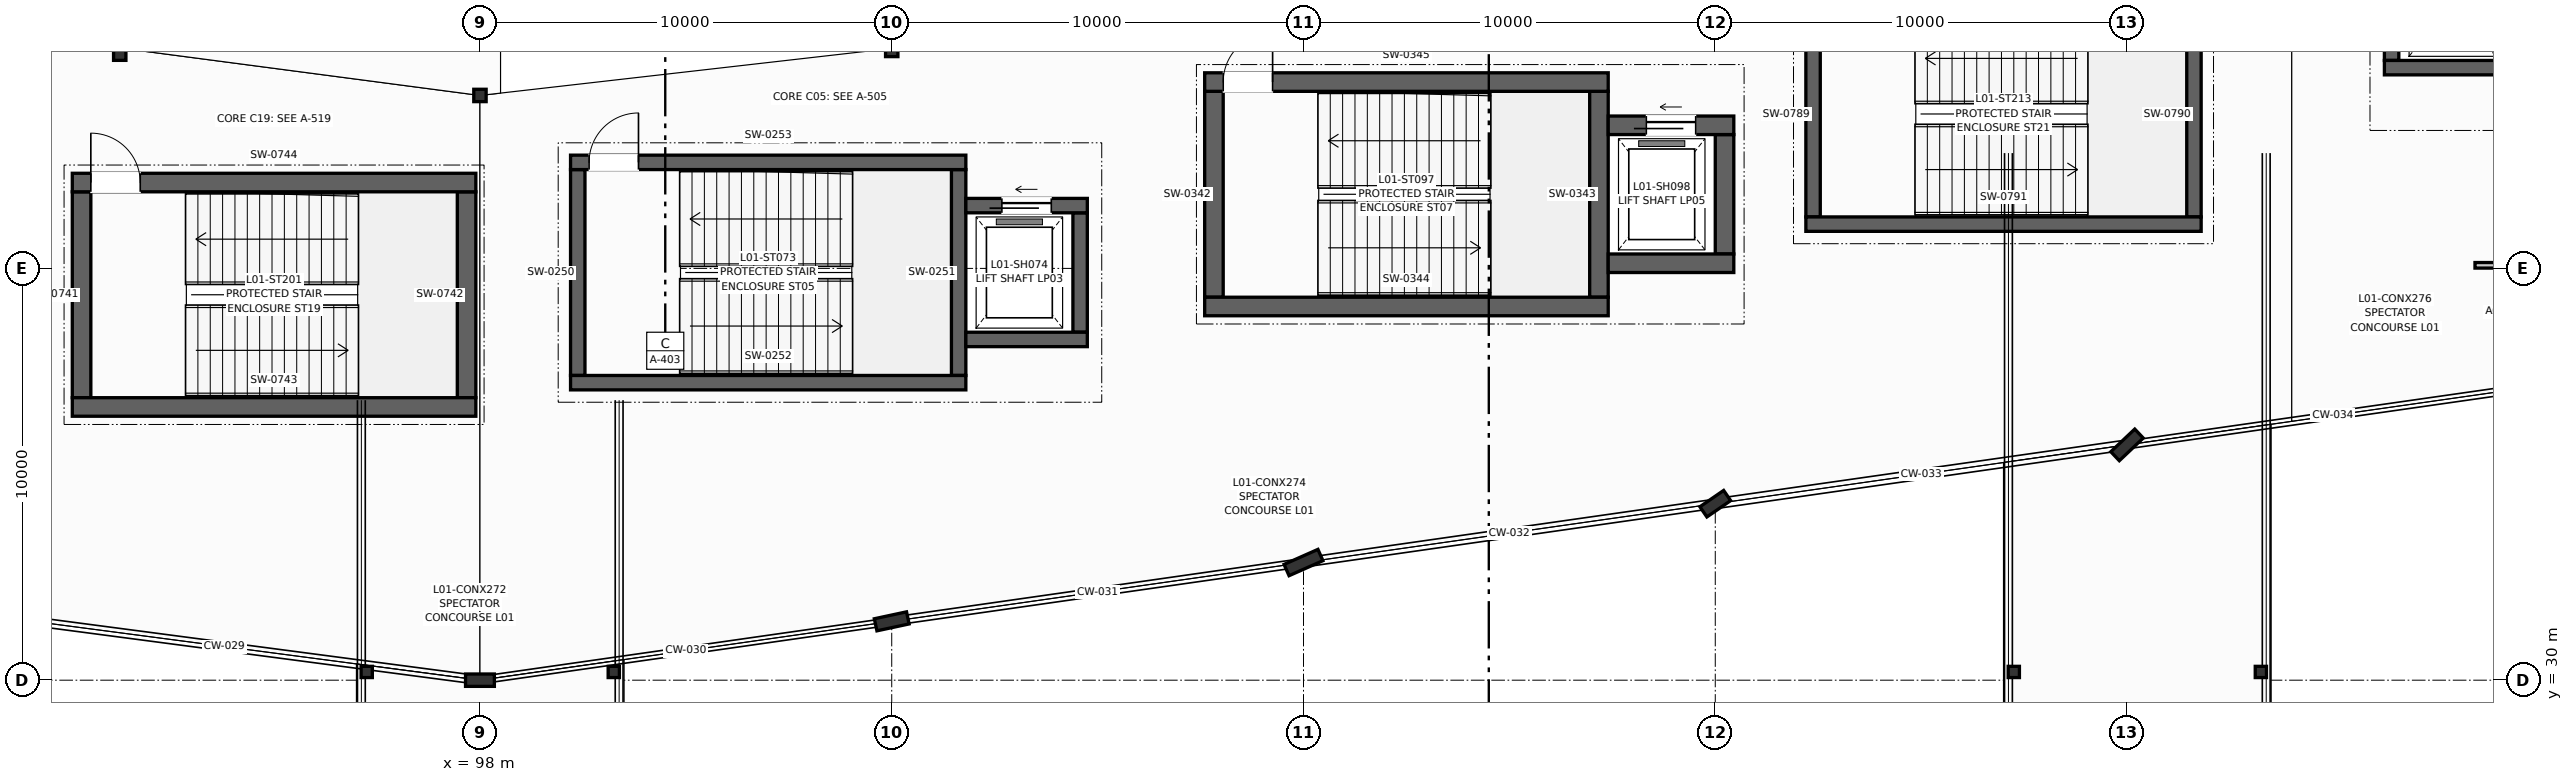
"""IFC4 building model, lengths in metres.
Left out: names, types, materials, properties, quantities, classifications, styles, units other than length and angle.
Written with IfcOpenShell. Run it as: python <this file> out.ifc"""

import sys

from ifc_helpers import new_model, si_unit, direction, frame, frame_2d, origin, origin_2d, place, context, subcontext, project, spatial, rectangle, hollow_circle, i_section, extrude, element, fill, save


model = new_model("IFC4")
c1 = context("Model", 3, precision=1e-05, world=origin(), true_north=direction((0.0, 1.0)))
c2 = subcontext(c1, "Body", "Model", "MODEL_VIEW")
j1 = project(units=[si_unit("LENGTHUNIT", "METRE"), si_unit("PLANEANGLEUNIT", "RADIAN")], contexts=[c1])
p1 = place(None, origin())
s1 = spatial("IfcSite", under=j1, at=p1, CompositionType="ELEMENT")
p2 = place(p1, origin())
s2 = spatial("IfcBuilding", under=s1, at=p2, CompositionType="ELEMENT")
p3 = place(p2, frame((0.0, 0.0, 4.5)))
s3 = spatial("IfcBuildingStorey", under=s2, at=p3, CompositionType="ELEMENT", Elevation=4.5)
p4 = place(p3, frame((89.252, 45.352, 0.0), z_axis=(0.0, 0.0, 1.0), x_axis=(1.0, 0.0, 0.0)))
e1 = element("IfcColumn", 1, at=p4, inside=s3, PredefinedType="COLUMN", context=c2, shape_type="SweptSolid", body=[
    extrude(i_section(OverallWidth=0.3, OverallDepth=0.6, WebThickness=0.015, FlangeThickness=0.03, at=origin_2d()), origin(), (0.0, 0.0, 1.0), 4.5),
])
p5 = place(p3, frame((98.0, 44.2, 0.0), z_axis=(0.0, 0.0, 1.0), x_axis=(1.0, 0.0, 0.0)))
e2 = element("IfcColumn", 2, at=p5, inside=s3, PredefinedType="COLUMN", context=c2, shape_type="SweptSolid", body=[
    extrude(i_section(OverallWidth=0.3, OverallDepth=0.3, WebThickness=0.011, FlangeThickness=0.019, at=origin_2d()), origin(), (0.0, 0.0, 1.0), 4.5),
])
p6 = place(p3, frame((108.0, 45.343, 0.0), z_axis=(0.0, 0.0, 1.0), x_axis=(1.0, 0.0, 0.0)))
e3 = element("IfcColumn", 3, at=p6, inside=s3, PredefinedType="COLUMN", context=c2, shape_type="SweptSolid", body=[
    extrude(i_section(OverallWidth=0.3, OverallDepth=0.4, WebThickness=0.013, FlangeThickness=0.024, at=origin_2d()), origin(), (0.0, 0.0, 1.0), 4.5),
])
p7 = place(p3, frame((98.0, 30.0, 0.0), z_axis=(0.0, 0.0, 1.0), x_axis=(0.0, 1.0, 0.0)))
e4 = element("IfcColumn", 4, at=p7, inside=s3, PredefinedType="COLUMN", context=c2, shape_type="SweptSolid", body=[
    extrude(i_section(OverallWidth=0.3, OverallDepth=0.7, WebThickness=0.017, FlangeThickness=0.032, at=origin_2d()), origin(), (0.0, 0.0, 1.0), 4.5),
])
p8 = place(p3, frame((108.0, 31.429, 0.0), z_axis=(0.0, 0.0, 1.0), x_axis=(-0.209618562904, 0.977783236759, 0.0)))
e5 = element("IfcColumn", 5, at=p8, inside=s3, PredefinedType="COLUMN", context=c2, shape_type="SweptSolid", body=[
    extrude(i_section(OverallWidth=0.3, OverallDepth=0.8, WebThickness=0.018, FlangeThickness=0.033, at=origin_2d()), origin(), (0.0, 0.0, 1.0), 4.5),
])
p9 = place(p3, frame((118.0, 32.857, 0.0), z_axis=(0.0, 0.0, 1.0), x_axis=(-0.40514158678, 0.914253955234, 0.0)))
e6 = element("IfcColumn", 6, at=p9, inside=s3, PredefinedType="COLUMN", context=c2, shape_type="SweptSolid", body=[
    extrude(i_section(OverallWidth=0.3, OverallDepth=0.9, WebThickness=0.019, FlangeThickness=0.035, at=origin_2d()), origin(), (0.0, 0.0, 1.0), 4.5),
])
p10 = place(p3, frame((128.0, 34.286, 0.0), z_axis=(0.0, 0.0, 1.0), x_axis=(-0.566406236925, 0.824126188622, 0.0)))
e7 = element("IfcColumn", 7, at=p10, inside=s3, PredefinedType="COLUMN", context=c2, shape_type="SweptSolid", body=[
    extrude(i_section(OverallWidth=0.3, OverallDepth=0.7, WebThickness=0.017, FlangeThickness=0.032, at=origin_2d()), origin(), (0.0, 0.0, 1.0), 4.5),
])
p11 = place(p3, frame((138.0, 35.714, 0.0), z_axis=(0.0, 0.0, 1.0), x_axis=(-0.687087510804, 0.726574670971, 0.0)))
e8 = element("IfcColumn", 8, at=p11, inside=s3, PredefinedType="COLUMN", context=c2, shape_type="SweptSolid", body=[
    extrude(i_section(OverallWidth=0.3, OverallDepth=0.8, WebThickness=0.018, FlangeThickness=0.033, at=origin_2d()), origin(), (0.0, 0.0, 1.0), 4.5),
])
for number, where, z_axis, x_axis in (
    (9, (95.25, 30.2, 0.0), (0.0, 0.0, 1.0), (1.0, 0.0, 0.0)),
    (10, (101.25, 30.2, 0.0), (0.0, 0.0, 1.0), (1.0, 0.0, 0.0)),
    (11, (135.25, 30.2, 0.0), (0.0, 0.0, 1.0), (1.0, 0.0, 0.0)),
    (12, (141.25, 30.2, 0.0), (0.0, 0.0, 1.0), (1.0, 0.0, 0.0)),
):
    element("IfcColumn", number, at=place(p3, frame(where, z_axis=z_axis, x_axis=x_axis)), inside=s3, PredefinedType="COLUMN", context=c2, shape_type="SweptSolid", body=[
        extrude(hollow_circle(Radius=0.136, WallThickness=0.012, at=origin_2d()), origin(), (0.0, 0.0, 1.0), 4.5),
    ])
for number, where, z_axis, x_axis in (
    (13, (100.375, 37.4, 0.0), (0.0, 0.0, 1.0), (0.0, 1.0, 0.0)),
    (14, (109.625, 37.4, 0.0), (0.0, 0.0, 1.0), (0.0, 1.0, 0.0)),
):
    element("IfcWall", number, at=place(p3, frame(where, z_axis=z_axis, x_axis=x_axis)), inside=s3, PredefinedType="SHEAR", context=c2, shape_type="SweptSolid", body=[
        extrude(rectangle(XDim=5.0, YDim=0.35, at=frame_2d((2.5, 0.0))), origin(), (0.0, 0.0, 1.0), 4.25),
    ])
p12 = place(p3, frame((100.2, 37.225, 0.0), z_axis=(0.0, 0.0, 1.0), x_axis=(1.0, 0.0, 0.0)))
e15 = element("IfcWall", 15, at=p12, inside=s3, PredefinedType="SHEAR", context=c2, shape_type="SweptSolid", body=[
    extrude(rectangle(XDim=9.6, YDim=0.35, at=frame_2d((4.8, 0.0))), origin(), (0.0, 0.0, 1.0), 4.25),
])
p13 = place(p3, frame((100.2, 42.575, 0.0), z_axis=(0.0, 0.0, 1.0), x_axis=(1.0, 0.0, 0.0)))
e16 = element("IfcWall", 16, at=p13, inside=s3, PredefinedType="SHEAR", context=c2, shape_type="SweptSolid", body=[
    extrude(rectangle(XDim=9.6, YDim=0.35, at=frame_2d((4.8, 0.0))), origin(), (0.0, 0.0, 1.0), 4.25),
])
p14 = place(p13, frame((0.45, 0.0, 0.0)))
e17 = element("IfcOpeningElement", 17, at=p14, cuts=e16, PredefinedType="OPENING", context=c2, shape_type="SweptSolid", body=[
    extrude(rectangle(XDim=1.2, YDim=2.2, at=frame_2d((0.6, 1.1))), frame((0.0, 0.185, 0.0), z_axis=(0.0, -1.0, 0.0), x_axis=(1.0, 0.0, 0.0)), (0.0, 0.0, 1.0), 0.37),
])
p15 = place(p3, frame((112.575, 38.45, 0.0), z_axis=(0.0, 0.0, 1.0), x_axis=(0.0, 1.0, 0.0)))
e18 = element("IfcWall", 18, at=p15, inside=s3, PredefinedType="SHEAR", context=c2, shape_type="SweptSolid", body=[
    extrude(rectangle(XDim=2.9, YDim=0.35, at=frame_2d((1.45, 0.0))), origin(), (0.0, 0.0, 1.0), 4.25),
])
p16 = place(p3, frame((109.8, 38.275, 0.0), z_axis=(0.0, 0.0, 1.0), x_axis=(1.0, 0.0, 0.0)))
e19 = element("IfcWall", 19, at=p16, inside=s3, PredefinedType="SHEAR", context=c2, shape_type="SweptSolid", body=[
    extrude(rectangle(XDim=2.95, YDim=0.35, at=frame_2d((1.475, 0.0))), origin(), (0.0, 0.0, 1.0), 4.25),
])
p17 = place(p3, frame((109.8, 41.525, 0.0), z_axis=(0.0, 0.0, 1.0), x_axis=(1.0, 0.0, 0.0)))
e20 = element("IfcWall", 20, at=p17, inside=s3, PredefinedType="SHEAR", context=c2, shape_type="SweptSolid", body=[
    extrude(rectangle(XDim=2.95, YDim=0.35, at=frame_2d((1.475, 0.0))), origin(), (0.0, 0.0, 1.0), 4.25),
])
p18 = place(p17, frame((0.875, 0.0, 0.0)))
e21 = element("IfcOpeningElement", 21, at=p18, cuts=e20, PredefinedType="OPENING", context=c2, shape_type="SweptSolid", body=[
    extrude(rectangle(XDim=1.2, YDim=2.2, at=frame_2d((0.6, 1.1))), frame((0.0, 0.185, 0.0), z_axis=(0.0, -1.0, 0.0), x_axis=(1.0, 0.0, 0.0)), (0.0, 0.0, 1.0), 0.37),
])
for number, where, z_axis, x_axis in (
    (22, (115.825, 39.3, 0.0), (0.0, 0.0, 1.0), (0.0, 1.0, 0.0)),
    (23, (125.175, 39.3, 0.0), (0.0, 0.0, 1.0), (0.0, 1.0, 0.0)),
):
    element("IfcWall", number, at=place(p3, frame(where, z_axis=z_axis, x_axis=x_axis)), inside=s3, PredefinedType="SHEAR", context=c2, shape_type="SweptSolid", body=[
        extrude(rectangle(XDim=5.0, YDim=0.45, at=frame_2d((2.5, 0.0))), origin(), (0.0, 0.0, 1.0), 4.25),
    ])
p19 = place(p3, frame((115.6, 39.075, 0.0), z_axis=(0.0, 0.0, 1.0), x_axis=(1.0, 0.0, 0.0)))
e24 = element("IfcWall", 24, at=p19, inside=s3, PredefinedType="SHEAR", context=c2, shape_type="SweptSolid", body=[
    extrude(rectangle(XDim=9.8, YDim=0.45, at=frame_2d((4.9, 0.0))), origin(), (0.0, 0.0, 1.0), 4.25),
])
p20 = place(p3, frame((115.6, 44.525, 0.0), z_axis=(0.0, 0.0, 1.0), x_axis=(1.0, 0.0, 0.0)))
e25 = element("IfcWall", 25, at=p20, inside=s3, PredefinedType="SHEAR", context=c2, shape_type="SweptSolid", body=[
    extrude(rectangle(XDim=9.8, YDim=0.45, at=frame_2d((4.9, 0.0))), origin(), (0.0, 0.0, 1.0), 4.25),
])
p21 = place(p20, frame((0.45, 0.0, 0.0)))
e26 = element("IfcOpeningElement", 26, at=p21, cuts=e25, PredefinedType="OPENING", context=c2, shape_type="SweptSolid", body=[
    extrude(rectangle(XDim=1.2, YDim=2.2, at=frame_2d((0.6, 1.1))), frame((0.0, 0.235, 0.0), z_axis=(0.0, -1.0, 0.0), x_axis=(1.0, 0.0, 0.0)), (0.0, 0.0, 1.0), 0.47),
])
p22 = place(p3, frame((128.225, 40.35, 0.0), z_axis=(0.0, 0.0, 1.0), x_axis=(0.0, 1.0, 0.0)))
e27 = element("IfcWall", 27, at=p22, inside=s3, PredefinedType="SHEAR", context=c2, shape_type="SweptSolid", body=[
    extrude(rectangle(XDim=2.9, YDim=0.45, at=frame_2d((1.45, 0.0))), origin(), (0.0, 0.0, 1.0), 4.25),
])
p23 = place(p3, frame((125.4, 40.125, 0.0), z_axis=(0.0, 0.0, 1.0), x_axis=(1.0, 0.0, 0.0)))
e28 = element("IfcWall", 28, at=p23, inside=s3, PredefinedType="SHEAR", context=c2, shape_type="SweptSolid", body=[
    extrude(rectangle(XDim=3.05, YDim=0.45, at=frame_2d((1.525, 0.0))), origin(), (0.0, 0.0, 1.0), 4.25),
])
p24 = place(p3, frame((125.4, 43.475, 0.0), z_axis=(0.0, 0.0, 1.0), x_axis=(1.0, 0.0, 0.0)))
e29 = element("IfcWall", 29, at=p24, inside=s3, PredefinedType="SHEAR", context=c2, shape_type="SweptSolid", body=[
    extrude(rectangle(XDim=3.05, YDim=0.45, at=frame_2d((1.525, 0.0))), origin(), (0.0, 0.0, 1.0), 4.25),
])
p25 = place(p24, frame((0.925, 0.0, 0.0)))
e30 = element("IfcOpeningElement", 30, at=p25, cuts=e29, PredefinedType="OPENING", context=c2, shape_type="SweptSolid", body=[
    extrude(rectangle(XDim=1.2, YDim=2.2, at=frame_2d((0.6, 1.1))), frame((0.0, 0.235, 0.0), z_axis=(0.0, -1.0, 0.0), x_axis=(1.0, 0.0, 0.0)), (0.0, 0.0, 1.0), 0.47),
])
p26 = place(p3, frame((144.425, 45.05, 0.0), z_axis=(0.0, 0.0, 1.0), x_axis=(0.0, 1.0, 0.0)))
e31 = element("IfcWall", 31, at=p26, inside=s3, PredefinedType="SHEAR", context=c2, shape_type="SweptSolid", body=[
    extrude(rectangle(XDim=2.9, YDim=0.35, at=frame_2d((1.45, 0.0))), origin(), (0.0, 0.0, 1.0), 4.25),
])
p27 = place(p3, frame((144.25, 44.875, 0.0), z_axis=(0.0, 0.0, 1.0), x_axis=(1.0, 0.0, 0.0)))
e32 = element("IfcWall", 32, at=p27, inside=s3, PredefinedType="SHEAR", context=c2, shape_type="SweptSolid", body=[
    extrude(rectangle(XDim=2.95, YDim=0.35, at=frame_2d((1.475, 0.0))), origin(), (0.0, 0.0, 1.0), 4.25),
])
for number, where, z_axis, x_axis in (
    (33, (88.325, 36.86, 0.0), (0.0, 0.0, 1.0), (0.0, 1.0, 0.0)),
    (34, (97.675, 36.86, 0.0), (0.0, 0.0, 1.0), (0.0, 1.0, 0.0)),
):
    element("IfcWall", number, at=place(p3, frame(where, z_axis=z_axis, x_axis=x_axis)), inside=s3, PredefinedType="SHEAR", context=c2, shape_type="SweptSolid", body=[
        extrude(rectangle(XDim=5.0, YDim=0.45, at=frame_2d((2.5, 0.0))), origin(), (0.0, 0.0, 1.0), 4.25),
    ])
p28 = place(p3, frame((88.1, 36.635, 0.0), z_axis=(0.0, 0.0, 1.0), x_axis=(1.0, 0.0, 0.0)))
e35 = element("IfcWall", 35, at=p28, inside=s3, PredefinedType="SHEAR", context=c2, shape_type="SweptSolid", body=[
    extrude(rectangle(XDim=9.8, YDim=0.45, at=frame_2d((4.9, 0.0))), origin(), (0.0, 0.0, 1.0), 4.25),
])
p29 = place(p3, frame((88.1, 42.085, 0.0), z_axis=(0.0, 0.0, 1.0), x_axis=(1.0, 0.0, 0.0)))
e36 = element("IfcWall", 36, at=p29, inside=s3, PredefinedType="SHEAR", context=c2, shape_type="SweptSolid", body=[
    extrude(rectangle(XDim=9.8, YDim=0.45, at=frame_2d((4.9, 0.0))), origin(), (0.0, 0.0, 1.0), 4.25),
])
p30 = place(p29, frame((0.45, 0.0, 0.0)))
e37 = element("IfcOpeningElement", 37, at=p30, cuts=e36, PredefinedType="OPENING", context=c2, shape_type="SweptSolid", body=[
    extrude(rectangle(XDim=1.2, YDim=2.2, at=frame_2d((0.6, 1.1))), frame((0.0, 0.235, 0.0), z_axis=(0.0, -1.0, 0.0), x_axis=(1.0, 0.0, 0.0)), (0.0, 0.0, 1.0), 0.47),
])
for number, where, z_axis, x_axis in (
    (38, (130.375, 41.25, 0.0), (0.0, 0.0, 1.0), (0.0, 1.0, 0.0)),
    (39, (139.625, 41.25, 0.0), (0.0, 0.0, 1.0), (0.0, 1.0, 0.0)),
):
    element("IfcWall", number, at=place(p3, frame(where, z_axis=z_axis, x_axis=x_axis)), inside=s3, PredefinedType="SHEAR", context=c2, shape_type="SweptSolid", body=[
        extrude(rectangle(XDim=5.0, YDim=0.35, at=frame_2d((2.5, 0.0))), origin(), (0.0, 0.0, 1.0), 4.25),
    ])
p31 = place(p3, frame((130.2, 41.075, 0.0), z_axis=(0.0, 0.0, 1.0), x_axis=(1.0, 0.0, 0.0)))
e40 = element("IfcWall", 40, at=p31, inside=s3, PredefinedType="SHEAR", context=c2, shape_type="SweptSolid", body=[
    extrude(rectangle(XDim=9.6, YDim=0.35, at=frame_2d((4.8, 0.0))), origin(), (0.0, 0.0, 1.0), 4.25),
])
p32 = place(p3, frame((146.45, 40.075, 0.0), z_axis=(0.0, 0.0, 1.0), x_axis=(1.0, 0.0, 0.0)))
e41 = element("IfcWall", 41, at=p32, inside=s3, PredefinedType="PARTITIONING", context=c2, shape_type="SweptSolid", body=[
    extrude(rectangle(XDim=13.1, YDim=0.135, at=frame_2d((6.55, 0.0))), origin(), (0.0, 0.0, 1.0), 3.22),
])
p33 = place(p32, frame((5.93, 0.0, 0.0)))
e42 = element("IfcOpeningElement", 42, at=p33, cuts=e41, PredefinedType="OPENING", context=c2, shape_type="SweptSolid", body=[
    extrude(rectangle(XDim=1.24, YDim=2.2, at=frame_2d((0.62, 1.1))), frame((0.0, 0.077, 0.0), z_axis=(0.0, -1.0, 0.0), x_axis=(1.0, 0.0, 0.0)), (0.0, 0.0, 1.0), 0.155),
])
p34 = place(p14, origin())
e43 = element("IfcDoor", 43, at=p34, inside=s3, OperationType="SINGLE_SWING_RIGHT", PredefinedType="DOOR", context=c2, shape_type="SweptSolid", body=[
    extrude(rectangle(XDim=1.2, YDim=2.2, at=frame_2d((0.6, 1.1))), frame((0.0, 0.025, 0.0), z_axis=(0.0, -1.0, 0.0), x_axis=(1.0, 0.0, 0.0)), (0.0, 0.0, 1.0), 0.05),
])
fill(e17, e43)
p35 = place(p18, origin())
e44 = element("IfcDoor", 44, at=p35, inside=s3, OperationType="SLIDING_TO_LEFT", PredefinedType="DOOR", context=c2, shape_type="SweptSolid", body=[
    extrude(rectangle(XDim=1.2, YDim=2.2, at=frame_2d((0.6, 1.1))), frame((0.0, 0.025, 0.0), z_axis=(0.0, -1.0, 0.0), x_axis=(1.0, 0.0, 0.0)), (0.0, 0.0, 1.0), 0.05),
])
fill(e21, e44)
p36 = place(p21, origin())
e45 = element("IfcDoor", 45, at=p36, inside=s3, OperationType="SINGLE_SWING_RIGHT", PredefinedType="DOOR", context=c2, shape_type="SweptSolid", body=[
    extrude(rectangle(XDim=1.2, YDim=2.2, at=frame_2d((0.6, 1.1))), frame((0.0, 0.025, 0.0), z_axis=(0.0, -1.0, 0.0), x_axis=(1.0, 0.0, 0.0)), (0.0, 0.0, 1.0), 0.05),
])
fill(e26, e45)
p37 = place(p25, origin())
e46 = element("IfcDoor", 46, at=p37, inside=s3, OperationType="SLIDING_TO_LEFT", PredefinedType="DOOR", context=c2, shape_type="SweptSolid", body=[
    extrude(rectangle(XDim=1.2, YDim=2.2, at=frame_2d((0.6, 1.1))), frame((0.0, 0.025, 0.0), z_axis=(0.0, -1.0, 0.0), x_axis=(1.0, 0.0, 0.0)), (0.0, 0.0, 1.0), 0.05),
])
fill(e30, e46)
p38 = place(p30, origin())
e47 = element("IfcDoor", 47, at=p38, inside=s3, OperationType="SINGLE_SWING_LEFT", PredefinedType="DOOR", context=c2, shape_type="SweptSolid", body=[
    extrude(rectangle(XDim=1.2, YDim=2.2, at=frame_2d((0.6, 1.1))), frame((0.0, 0.025, 0.0), z_axis=(0.0, -1.0, 0.0), x_axis=(1.0, 0.0, 0.0)), (0.0, 0.0, 1.0), 0.05),
])
fill(e37, e47)
save(model, sys.argv[1])
